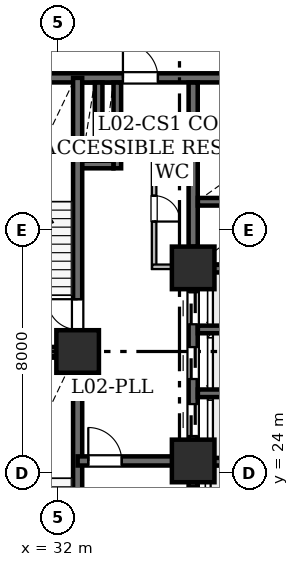
"""IFC4 building model, lengths in metres.
Left out: names, types, materials, properties, quantities, classifications, styles, units other than length and angle.
Written with IfcOpenShell. Run it as: python <this file> out.ifc"""

import sys

from ifc_helpers import new_model, si_unit, direction, frame, frame_2d, origin, origin_2d, place, context, subcontext, project, spatial, rectangle, hollow_rectangle, extrude, element, fill, save


model = new_model("IFC4")
c1 = context("Model", 3, precision=1e-05, world=origin(), true_north=direction((0.0, 1.0)))
c2 = subcontext(c1, "Body", "Model", "MODEL_VIEW")
j1 = project(units=[si_unit("LENGTHUNIT", "METRE"), si_unit("PLANEANGLEUNIT", "RADIAN")], contexts=[c1])
p1 = place(None, origin())
s1 = spatial("IfcSite", under=j1, at=p1, CompositionType="ELEMENT")
p2 = place(p1, origin())
s2 = spatial("IfcBuilding", under=s1, at=p2, CompositionType="ELEMENT")
p3 = place(p2, frame((0.0, 0.0, 12.0)))
s3 = spatial("IfcBuildingStorey", under=s2, at=p3, CompositionType="ELEMENT", Elevation=12.0)
for number, where, z_axis, x_axis in (
    (1, (32.65, 28.0, 0.0), (0.0, 0.0, 1.0), (1.0, 0.0, 0.0)),
    (2, (36.45, 24.4, 0.0), (0.0, 0.0, 1.0), (1.0, 0.0, 0.0)),
    (3, (36.45, 30.75, 0.0), (0.0, 0.0, 1.0), (1.0, 0.0, 0.0)),
):
    element("IfcColumn", number, at=place(p3, frame(where, z_axis=z_axis, x_axis=x_axis)), inside=s3, PredefinedType="COLUMN", context=c2, shape_type="SweptSolid", body=[
        extrude(hollow_rectangle(XDim=1.4, YDim=1.4, WallThickness=0.07, at=origin_2d()), origin(), (0.0, 0.0, 1.0), 4.2),
    ])
p4 = place(p3, frame((29.0, 37.0, 0.0), z_axis=(0.0, 0.0, 1.0), x_axis=(1.0, 0.0, 0.0)))
e4 = element("IfcWall", 4, at=p4, inside=s3, PredefinedType="SHEAR", context=c2, shape_type="SweptSolid", body=[
    extrude(rectangle(XDim=10.4, YDim=0.3, at=frame_2d((5.2, 0.0))), origin(), (0.0, 0.0, 1.0), 3.92),
])
p5 = place(p4, frame((5.14, 0.0, 0.0)))
e5 = element("IfcOpeningElement", 5, at=p5, cuts=e4, PredefinedType="OPENING", context=c2, shape_type="SweptSolid", body=[
    extrude(rectangle(XDim=1.15, YDim=2.2, at=frame_2d((0.575, 1.1))), frame((0.0, 0.16, 0.0), z_axis=(0.0, -1.0, 0.0), x_axis=(1.0, 0.0, 0.0)), (0.0, 0.0, 1.0), 0.32),
])
p6 = place(p3, frame((32.65, 19.0, 0.0), z_axis=(0.0, 0.0, 1.0), x_axis=(0.0, 1.0, 0.0)))
e6 = element("IfcWall", 6, at=p6, inside=s3, PredefinedType="SHEAR", context=c2, shape_type="SweptSolid", body=[
    extrude(rectangle(XDim=9.0, YDim=0.3, at=frame_2d((4.5, 0.0))), origin(), (0.0, 0.0, 1.0), 3.92),
])
p7 = place(p6, frame((0.72, 0.0, 0.0)))
e7 = element("IfcOpeningElement", 7, at=p7, cuts=e6, PredefinedType="OPENING", context=c2, shape_type="SweptSolid", body=[
    extrude(rectangle(XDim=1.0, YDim=2.15, at=frame_2d((0.5, 1.075))), frame((0.0, 0.16, 0.0), z_axis=(0.0, -1.0, 0.0), x_axis=(1.0, 0.0, 0.0)), (0.0, 0.0, 1.0), 0.32),
])
p8 = place(p3, frame((32.65, 28.0, 0.0), z_axis=(0.0, 0.0, 1.0), x_axis=(0.0, 1.0, 0.0)))
e8 = element("IfcWall", 8, at=p8, inside=s3, PredefinedType="SHEAR", context=c2, shape_type="SweptSolid", body=[
    extrude(rectangle(XDim=9.0, YDim=0.3, at=frame_2d((4.5, 0.0))), origin(), (0.0, 0.0, 1.0), 3.92),
])
p9 = place(p8, frame((0.72, 0.0, 0.0)))
e9 = element("IfcOpeningElement", 9, at=p9, cuts=e8, PredefinedType="OPENING", context=c2, shape_type="SweptSolid", body=[
    extrude(rectangle(XDim=1.0, YDim=2.15, at=frame_2d((0.5, 1.075))), frame((0.0, 0.16, 0.0), z_axis=(0.0, -1.0, 0.0), x_axis=(1.0, 0.0, 0.0)), (0.0, 0.0, 1.0), 0.32),
])
p10 = place(p3, frame((29.0, 28.0, 0.0), z_axis=(0.0, 0.0, 1.0), x_axis=(1.0, 0.0, 0.0)))
e10 = element("IfcWall", 10, at=p10, inside=s3, PredefinedType="SHEAR", context=c2, shape_type="SweptSolid", body=[
    extrude(rectangle(XDim=3.65, YDim=0.3, at=frame_2d((1.825, 0.0))), origin(), (0.0, 0.0, 1.0), 3.92),
])
p11 = place(p3, frame((32.65, 24.4, 0.0), z_axis=(0.0, 0.0, 1.0), x_axis=(1.0, 0.0, 0.0)))
e11 = element("IfcWall", 11, at=p11, inside=s3, PredefinedType="SHEAR", context=c2, shape_type="SweptSolid", body=[
    extrude(rectangle(XDim=3.8, YDim=0.3, at=frame_2d((1.9, 0.0))), origin(), (0.0, 0.0, 1.0), 3.92),
])
p12 = place(p11, frame((0.35, 0.0, 0.0)))
e12 = element("IfcOpeningElement", 12, at=p12, cuts=e11, PredefinedType="OPENING", context=c2, shape_type="SweptSolid", body=[
    extrude(rectangle(XDim=1.1, YDim=2.15, at=frame_2d((0.55, 1.075))), frame((0.0, 0.16, 0.0), z_axis=(0.0, -1.0, 0.0), x_axis=(1.0, 0.0, 0.0)), (0.0, 0.0, 1.0), 0.32),
])
p13 = place(p3, frame((36.45, 19.154, 0.0), z_axis=(0.0, 0.0, 1.0), x_axis=(0.0, 1.0, 0.0)))
e13 = element("IfcWall", 13, at=p13, inside=s3, PredefinedType="SHEAR", context=c2, shape_type="SweptSolid", body=[
    extrude(rectangle(XDim=4.546, YDim=0.3, at=frame_2d((2.273, 0.0))), origin(), (0.0, 0.0, 1.0), 3.92),
])
p14 = place(p13, frame((0.696, 0.0, 0.0)))
e14 = element("IfcOpeningElement", 14, at=p14, cuts=e13, PredefinedType="OPENING", context=c2, shape_type="SweptSolid", body=[
    extrude(rectangle(XDim=1.1, YDim=2.15, at=frame_2d((0.55, 1.075))), frame((0.0, 0.16, 0.0), z_axis=(0.0, -1.0, 0.0), x_axis=(1.0, 0.0, 0.0)), (0.0, 0.0, 1.0), 0.32),
])
p15 = place(p13, frame((3.316, 0.0, 0.0)))
e15 = element("IfcOpeningElement", 15, at=p15, cuts=e13, PredefinedType="OPENING", context=c2, shape_type="SweptSolid", body=[
    extrude(rectangle(XDim=1.1, YDim=2.15, at=frame_2d((0.55, 1.075))), frame((0.0, 0.16, 0.0), z_axis=(0.0, -1.0, 0.0), x_axis=(1.0, 0.0, 0.0)), (0.0, 0.0, 1.0), 0.32),
])
p16 = place(p3, frame((36.45, 25.1, 0.0), z_axis=(0.0, 0.0, 1.0), x_axis=(0.0, 1.0, 0.0)))
e16 = element("IfcWall", 16, at=p16, inside=s3, PredefinedType="SHEAR", context=c2, shape_type="SweptSolid", body=[
    extrude(rectangle(XDim=4.95, YDim=0.3, at=frame_2d((2.475, 0.0))), origin(), (0.0, 0.0, 1.0), 3.92),
])
p17 = place(p16, frame((0.12, 0.0, 0.0)))
e17 = element("IfcOpeningElement", 17, at=p17, cuts=e16, PredefinedType="OPENING", context=c2, shape_type="SweptSolid", body=[
    extrude(rectangle(XDim=1.05, YDim=2.15, at=frame_2d((0.525, 1.075))), frame((0.0, 0.16, 0.0), z_axis=(0.0, -1.0, 0.0), x_axis=(1.0, 0.0, 0.0)), (0.0, 0.0, 1.0), 0.32),
])
p18 = place(p16, frame((1.995, 0.0, 0.0)))
e18 = element("IfcOpeningElement", 18, at=p18, cuts=e16, PredefinedType="OPENING", context=c2, shape_type="SweptSolid", body=[
    extrude(rectangle(XDim=1.05, YDim=2.15, at=frame_2d((0.525, 1.075))), frame((0.0, 0.16, 0.0), z_axis=(0.0, -1.0, 0.0), x_axis=(1.0, 0.0, 0.0)), (0.0, 0.0, 1.0), 0.32),
])
p19 = place(p16, frame((3.795, 0.0, 0.0)))
e19 = element("IfcOpeningElement", 19, at=p19, cuts=e16, PredefinedType="OPENING", context=c2, shape_type="SweptSolid", body=[
    extrude(rectangle(XDim=1.05, YDim=2.15, at=frame_2d((0.525, 1.075))), frame((0.0, 0.16, 0.0), z_axis=(0.0, -1.0, 0.0), x_axis=(1.0, 0.0, 0.0)), (0.0, 0.0, 1.0), 0.32),
])
p20 = place(p3, frame((36.45, 31.45, 0.0), z_axis=(0.0, 0.0, 1.0), x_axis=(0.0, 1.0, 0.0)))
e20 = element("IfcWall", 20, at=p20, inside=s3, PredefinedType="SHEAR", context=c2, shape_type="SweptSolid", body=[
    extrude(rectangle(XDim=5.396, YDim=0.3, at=frame_2d((2.698, 0.0))), origin(), (0.0, 0.0, 1.0), 3.92),
])
for number, where, z_axis, x_axis in (
    (21, (36.604, 24.375, 0.0), (0.0, 0.0, 1.0), (1.0, 0.0, 0.0)),
    (22, (36.604, 26.625, 0.0), (0.0, 0.0, 1.0), (1.0, 0.0, 0.0)),
    (23, (36.604, 28.725, 0.0), (0.0, 0.0, 1.0), (1.0, 0.0, 0.0)),
    (24, (36.604, 30.725, 0.0), (0.0, 0.0, 1.0), (1.0, 0.0, 0.0)),
    (25, (36.604, 32.925, 0.0), (0.0, 0.0, 1.0), (1.0, 0.0, 0.0)),
    (26, (36.604, 34.975, 0.0), (0.0, 0.0, 1.0), (1.0, 0.0, 0.0)),
):
    element("IfcWall", number, at=place(p3, frame(where, z_axis=z_axis, x_axis=x_axis)), inside=s3, PredefinedType="SHEAR", context=c2, shape_type="SweptSolid", body=[
        extrude(rectangle(XDim=2.642, YDim=0.25, at=frame_2d((1.321, 0.0))), origin(), (0.0, 0.0, 1.0), 3.92),
    ])
p21 = place(p3, frame((33.955, 34.025, 0.0), z_axis=(0.0, 0.0, 1.0), x_axis=(0.0, 1.0, 0.0)))
e27 = element("IfcWall", 27, at=p21, inside=s3, PredefinedType="SHEAR", context=c2, shape_type="SweptSolid", body=[
    extrude(rectangle(XDim=2.821, YDim=0.25, at=frame_2d((1.411, 0.0))), origin(), (0.0, 0.0, 1.0), 3.92),
])
p22 = place(p3, frame((32.804, 34.15, 0.0), z_axis=(0.0, 0.0, 1.0), x_axis=(1.0, 0.0, 0.0)))
e28 = element("IfcWall", 28, at=p22, inside=s3, PredefinedType="SHEAR", context=c2, shape_type="SweptSolid", body=[
    extrude(rectangle(XDim=1.022, YDim=0.25, at=frame_2d((0.511, 0.0))), origin(), (0.0, 0.0, 1.0), 3.92),
])
p23 = place(p3, frame((33.34, 34.279, 0.0), z_axis=(0.0, 0.0, 1.0), x_axis=(0.0, 1.0, 0.0)))
e29 = element("IfcWall", 29, at=p23, inside=s3, PredefinedType="SHEAR", context=c2, shape_type="SweptSolid", body=[
    extrude(rectangle(XDim=2.567, YDim=0.25, at=frame_2d((1.283, 0.0))), origin(), (0.0, 0.0, 1.0), 3.92),
])
p24 = place(p3, frame((36.306, 34.615, 0.0), z_axis=(0.0, 0.0, 1.0), x_axis=(-1.0, 0.0, 0.0)))
e30 = element("IfcWall", 30, at=p24, inside=s3, PredefinedType="STANDARD", context=c2, shape_type="SweptSolid", body=[
    extrude(rectangle(XDim=1.206, YDim=0.15, at=frame_2d((0.603, 0.0))), origin(), (0.0, 0.0, 1.0), 3.92),
])
p25 = place(p3, frame((35.165, 34.678, 0.0), z_axis=(0.0, 0.0, 1.0), x_axis=(0.0, -1.0, 0.0)))
e31 = element("IfcWall", 31, at=p25, inside=s3, PredefinedType="STANDARD", context=c2, shape_type="SweptSolid", body=[
    extrude(rectangle(XDim=3.958, YDim=0.15, at=frame_2d((1.979, 0.0))), origin(), (0.0, 0.0, 1.0), 3.92),
])
p26 = place(p25, frame((1.554, 0.0, 0.0)))
e32 = element("IfcOpeningElement", 32, at=p26, cuts=e31, PredefinedType="OPENING", context=c2, shape_type="SweptSolid", body=[
    extrude(rectangle(XDim=0.85, YDim=2.1, at=frame_2d((0.425, 1.05))), frame((0.0, 0.085, 0.0), z_axis=(0.0, -1.0, 0.0), x_axis=(1.0, 0.0, 0.0)), (0.0, 0.0, 1.0), 0.17),
])
p27 = place(p3, frame((35.102, 30.785, 0.0), z_axis=(0.0, 0.0, 1.0), x_axis=(1.0, 0.0, 0.0)))
e33 = element("IfcWall", 33, at=p27, inside=s3, PredefinedType="STANDARD", context=c2, shape_type="SweptSolid", body=[
    extrude(rectangle(XDim=1.198, YDim=0.15, at=frame_2d((0.599, 0.0))), origin(), (0.0, 0.0, 1.0), 3.92),
])
p28 = place(p9, origin())
e34 = element("IfcDoor", 34, at=p28, inside=s3, OperationType="SINGLE_SWING_RIGHT", PredefinedType="DOOR", context=c2, shape_type="SweptSolid", body=[
    extrude(rectangle(XDim=1.0, YDim=2.15, at=frame_2d((0.5, 1.075))), frame((0.0, 0.025, 0.0), z_axis=(0.0, -1.0, 0.0), x_axis=(1.0, 0.0, 0.0)), (0.0, 0.0, 1.0), 0.05),
])
fill(e9, e34)
p29 = place(p12, origin())
e35 = element("IfcDoor", 35, at=p29, inside=s3, OperationType="SINGLE_SWING_LEFT", PredefinedType="DOOR", context=c2, shape_type="SweptSolid", body=[
    extrude(rectangle(XDim=1.1, YDim=2.15, at=frame_2d((0.55, 1.075))), frame((0.0, 0.025, 0.0), z_axis=(0.0, -1.0, 0.0), x_axis=(1.0, 0.0, 0.0)), (0.0, 0.0, 1.0), 0.05),
])
fill(e12, e35)
p30 = place(p5, origin())
e36 = element("IfcDoor", 36, at=p30, inside=s3, OperationType="SINGLE_SWING_LEFT", PredefinedType="DOOR", context=c2, shape_type="SweptSolid", body=[
    extrude(rectangle(XDim=1.15, YDim=2.2, at=frame_2d((0.575, 1.1))), frame((0.0, 0.025, 0.0), z_axis=(0.0, -1.0, 0.0), x_axis=(1.0, 0.0, 0.0)), (0.0, 0.0, 1.0), 0.05),
])
fill(e5, e36)
p31 = place(p15, origin())
e37 = element("IfcDoor", 37, at=p31, inside=s3, OperationType="SLIDING_TO_LEFT", PredefinedType="DOOR", context=c2, shape_type="SweptSolid", body=[
    extrude(rectangle(XDim=1.1, YDim=2.15, at=frame_2d((0.55, 1.075))), frame((0.0, 0.025, 0.0), z_axis=(0.0, -1.0, 0.0), x_axis=(1.0, 0.0, 0.0)), (0.0, 0.0, 1.0), 0.05),
])
fill(e15, e37)
p32 = place(p17, origin())
e38 = element("IfcDoor", 38, at=p32, inside=s3, OperationType="SLIDING_TO_LEFT", PredefinedType="DOOR", context=c2, shape_type="SweptSolid", body=[
    extrude(rectangle(XDim=1.05, YDim=2.15, at=frame_2d((0.525, 1.075))), frame((0.0, 0.025, 0.0), z_axis=(0.0, -1.0, 0.0), x_axis=(1.0, 0.0, 0.0)), (0.0, 0.0, 1.0), 0.05),
])
fill(e17, e38)
p33 = place(p18, origin())
e39 = element("IfcDoor", 39, at=p33, inside=s3, OperationType="SLIDING_TO_LEFT", PredefinedType="DOOR", context=c2, shape_type="SweptSolid", body=[
    extrude(rectangle(XDim=1.05, YDim=2.15, at=frame_2d((0.525, 1.075))), frame((0.0, 0.025, 0.0), z_axis=(0.0, -1.0, 0.0), x_axis=(1.0, 0.0, 0.0)), (0.0, 0.0, 1.0), 0.05),
])
fill(e18, e39)
p34 = place(p19, origin())
e40 = element("IfcDoor", 40, at=p34, inside=s3, OperationType="SLIDING_TO_LEFT", PredefinedType="DOOR", context=c2, shape_type="SweptSolid", body=[
    extrude(rectangle(XDim=1.05, YDim=2.15, at=frame_2d((0.525, 1.075))), frame((0.0, 0.025, 0.0), z_axis=(0.0, -1.0, 0.0), x_axis=(1.0, 0.0, 0.0)), (0.0, 0.0, 1.0), 0.05),
])
fill(e19, e40)
p35 = place(p26, origin())
e41 = element("IfcDoor", 41, at=p35, inside=s3, OperationType="SINGLE_SWING_RIGHT", PredefinedType="DOOR", context=c2, shape_type="SweptSolid", body=[
    extrude(rectangle(XDim=0.85, YDim=2.1, at=frame_2d((0.425, 1.05))), frame((0.0, 0.025, 0.0), z_axis=(0.0, -1.0, 0.0), x_axis=(1.0, 0.0, 0.0)), (0.0, 0.0, 1.0), 0.05),
])
fill(e32, e41)
save(model, sys.argv[1])
